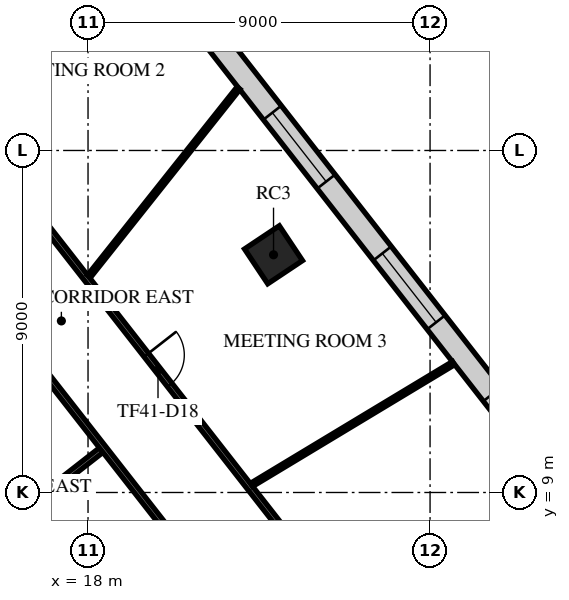
"""IFC4 building model, lengths in metres.
Left out: names, types, materials, properties, quantities, classifications, styles, units other than length and angle.
Written with IfcOpenShell. Run it as: python <this file> out.ifc"""

import sys

from ifc_helpers import new_model, si_unit, direction, frame, frame_2d, origin, origin_2d, place, context, subcontext, project, spatial, rectangle, extrude, element, fill, save


model = new_model("IFC4")
c1 = context("Model", 3, precision=1e-05, world=origin(), true_north=direction((0.0, 1.0)))
c2 = subcontext(c1, "Body", "Model", "MODEL_VIEW")
j1 = project(units=[si_unit("LENGTHUNIT", "METRE"), si_unit("PLANEANGLEUNIT", "RADIAN")], contexts=[c1])
p1 = place(None, origin())
s1 = spatial("IfcSite", under=j1, at=p1, CompositionType="ELEMENT")
p2 = place(p1, origin())
s2 = spatial("IfcBuilding", under=s1, at=p2, CompositionType="ELEMENT")
p3 = place(p2, frame((0.0, 0.0, 175.7)))
s3 = spatial("IfcBuildingStorey", under=s2, at=p3, CompositionType="ELEMENT", Elevation=175.7)
p4 = place(p3, frame((22.881, 15.255, 0.0), z_axis=(0.0, 0.0, 1.0), x_axis=(0.832028680356, 0.55473261583, 0.0)))
e1 = element("IfcColumn", 1, at=p4, inside=s3, PredefinedType="COLUMN", context=c2, shape_type="SweptSolid", body=[
    extrude(rectangle(XDim=1.1, YDim=1.1, at=origin_2d()), origin(), (0.0, 0.0, 1.0), 4.0),
])
p5 = place(p3, frame((36.503, 1.52, 0.0), z_axis=(0.0, 0.0, 1.0), x_axis=(-0.615660779349, 0.788011297363, 0.0)))
e2 = element("IfcWall", 2, at=p5, inside=s3, PredefinedType="STANDARD", context=c2, shape_type="SweptSolid", body=[
    extrude(rectangle(XDim=42.176, YDim=0.6, at=frame_2d((21.088, 0.0))), origin(), (0.0, 0.0, 1.0), 3.6),
])
p6 = place(p5, frame((1.138, 0.0, 0.9)))
e3 = element("IfcOpeningElement", 3, at=p6, cuts=e2, PredefinedType="OPENING", context=c2, shape_type="SweptSolid", body=[
    extrude(rectangle(XDim=2.3, YDim=2.1, at=frame_2d((1.15, 1.05))), frame((0.0, 0.31, 0.0), z_axis=(0.0, -1.0, 0.0), x_axis=(1.0, 0.0, 0.0)), (0.0, 0.0, 1.0), 0.62),
])
p7 = place(p5, frame((5.776, 0.0, 0.9)))
e4 = element("IfcOpeningElement", 4, at=p7, cuts=e2, PredefinedType="OPENING", context=c2, shape_type="SweptSolid", body=[
    extrude(rectangle(XDim=2.3, YDim=2.1, at=frame_2d((1.15, 1.05))), frame((0.0, 0.31, 0.0), z_axis=(0.0, -1.0, 0.0), x_axis=(1.0, 0.0, 0.0)), (0.0, 0.0, 1.0), 0.62),
])
p8 = place(p5, frame((10.476, 0.0, 0.9)))
e5 = element("IfcOpeningElement", 5, at=p8, cuts=e2, PredefinedType="OPENING", context=c2, shape_type="SweptSolid", body=[
    extrude(rectangle(XDim=2.3, YDim=2.1, at=frame_2d((1.15, 1.05))), frame((0.0, 0.31, 0.0), z_axis=(0.0, -1.0, 0.0), x_axis=(1.0, 0.0, 0.0)), (0.0, 0.0, 1.0), 0.62),
])
p9 = place(p5, frame((15.176, 0.0, 0.9)))
e6 = element("IfcOpeningElement", 6, at=p9, cuts=e2, PredefinedType="OPENING", context=c2, shape_type="SweptSolid", body=[
    extrude(rectangle(XDim=2.3, YDim=2.1, at=frame_2d((1.15, 1.05))), frame((0.0, 0.31, 0.0), z_axis=(0.0, -1.0, 0.0), x_axis=(1.0, 0.0, 0.0)), (0.0, 0.0, 1.0), 0.62),
])
p10 = place(p5, frame((19.876, 0.0, 0.9)))
e7 = element("IfcOpeningElement", 7, at=p10, cuts=e2, PredefinedType="OPENING", context=c2, shape_type="SweptSolid", body=[
    extrude(rectangle(XDim=2.3, YDim=2.1, at=frame_2d((1.15, 1.05))), frame((0.0, 0.31, 0.0), z_axis=(0.0, -1.0, 0.0), x_axis=(1.0, 0.0, 0.0)), (0.0, 0.0, 1.0), 0.62),
])
p11 = place(p5, frame((24.576, 0.0, 0.9)))
e8 = element("IfcOpeningElement", 8, at=p11, cuts=e2, PredefinedType="OPENING", context=c2, shape_type="SweptSolid", body=[
    extrude(rectangle(XDim=2.3, YDim=2.1, at=frame_2d((1.15, 1.05))), frame((0.0, 0.31, 0.0), z_axis=(0.0, -1.0, 0.0), x_axis=(1.0, 0.0, 0.0)), (0.0, 0.0, 1.0), 0.62),
])
p12 = place(p5, frame((33.976, 0.0, 0.9)))
e9 = element("IfcOpeningElement", 9, at=p12, cuts=e2, PredefinedType="OPENING", context=c2, shape_type="SweptSolid", body=[
    extrude(rectangle(XDim=2.3, YDim=2.1, at=frame_2d((1.15, 1.05))), frame((0.0, 0.31, 0.0), z_axis=(0.0, -1.0, 0.0), x_axis=(1.0, 0.0, 0.0)), (0.0, 0.0, 1.0), 0.62),
])
p13 = place(p5, frame((38.676, 0.0, 0.9)))
e10 = element("IfcOpeningElement", 10, at=p13, cuts=e2, PredefinedType="OPENING", context=c2, shape_type="SweptSolid", body=[
    extrude(rectangle(XDim=2.3, YDim=2.1, at=frame_2d((1.15, 1.05))), frame((0.0, 0.31, 0.0), z_axis=(0.0, -1.0, 0.0), x_axis=(1.0, 0.0, 0.0)), (0.0, 0.0, 1.0), 0.62),
])
p14 = place(p3, frame((9.713, 25.187, 0.0), z_axis=(0.0, 0.0, 1.0), x_axis=(0.615659714696, -0.788012129158, 0.0)))
e11 = element("IfcWall", 11, at=p14, inside=s3, PredefinedType="PARTITIONING", context=c2, shape_type="SweptSolid", body=[
    extrude(rectangle(XDim=27.811, YDim=0.15, at=frame_2d((13.905, 0.0))), origin(), (0.0, 0.0, 1.0), 3.15),
])
p15 = place(p14, frame((8.299, 0.0, 0.0)))
e12 = element("IfcOpeningElement", 12, at=p15, cuts=e11, PredefinedType="OPENING", context=c2, shape_type="SweptSolid", body=[
    extrude(rectangle(XDim=1.0, YDim=2.1, at=frame_2d((0.5, 1.05))), frame((0.0, 0.085, 0.0), z_axis=(0.0, -1.0, 0.0), x_axis=(1.0, 0.0, 0.0)), (0.0, 0.0, 1.0), 0.17),
])
p16 = place(p14, frame((15.951, 0.0, 0.0)))
e13 = element("IfcOpeningElement", 13, at=p16, cuts=e11, PredefinedType="OPENING", context=c2, shape_type="SweptSolid", body=[
    extrude(rectangle(XDim=1.0, YDim=2.1, at=frame_2d((0.5, 1.05))), frame((0.0, 0.085, 0.0), z_axis=(0.0, -1.0, 0.0), x_axis=(1.0, 0.0, 0.0)), (0.0, 0.0, 1.0), 0.17),
])
p17 = place(p3, frame((15.521, 7.908, 0.0), z_axis=(0.0, 0.0, 1.0), x_axis=(0.787935399888, 0.615757911524, 0.0)))
e14 = element("IfcWall", 14, at=p17, inside=s3, PredefinedType="PARTITIONING", context=c2, shape_type="SweptSolid", body=[
    extrude(rectangle(XDim=3.661, YDim=0.15, at=frame_2d((1.831, 0.0))), origin(), (0.0, 0.0, 1.0), 3.15),
])
p18 = place(p3, frame((16.929, 12.053, 0.0), z_axis=(0.0, 0.0, 1.0), x_axis=(0.615693171882, -0.787985988516, 0.0)))
e15 = element("IfcWall", 15, at=p18, inside=s3, PredefinedType="PARTITIONING", context=c2, shape_type="SweptSolid", body=[
    extrude(rectangle(XDim=13.018, YDim=0.15, at=frame_2d((6.509, 0.0))), origin(), (0.0, 0.0, 1.0), 3.15),
])
p19 = place(p3, frame((18.025, 14.689, 0.0), z_axis=(0.0, 0.0, 1.0), x_axis=(0.622051275171, 0.782976507348, 0.0)))
e16 = element("IfcWall", 16, at=p19, inside=s3, PredefinedType="PARTITIONING", context=c2, shape_type="SweptSolid", body=[
    extrude(rectangle(XDim=6.326, YDim=0.1, at=frame_2d((3.163, 0.0))), origin(), (0.0, 0.0, 1.0), 2.9),
])
p20 = place(p3, frame((22.305, 9.202, 0.0), z_axis=(0.0, 0.0, 1.0), x_axis=(0.856511778294, 0.516127478095, 0.0)))
e17 = element("IfcWall", 17, at=p20, inside=s3, PredefinedType="PARTITIONING", context=c2, shape_type="SweptSolid", body=[
    extrude(rectangle(XDim=6.201, YDim=0.1, at=frame_2d((3.101, 0.0))), origin(), (0.0, 0.0, 1.0), 2.9),
])
p21 = place(p9, origin())
e18 = element("IfcWindow", 18, at=p21, inside=s3, PartitioningType="SINGLE_PANEL", PredefinedType="WINDOW", context=c2, shape_type="SweptSolid", body=[
    extrude(rectangle(XDim=2.3, YDim=2.1, at=frame_2d((1.15, 1.05))), frame((0.0, 0.03, 0.0), z_axis=(0.0, -1.0, 0.0), x_axis=(1.0, 0.0, 0.0)), (0.0, 0.0, 1.0), 0.06),
])
fill(e6, e18)
p22 = place(p10, origin())
e19 = element("IfcWindow", 19, at=p22, inside=s3, PartitioningType="SINGLE_PANEL", PredefinedType="WINDOW", context=c2, shape_type="SweptSolid", body=[
    extrude(rectangle(XDim=2.3, YDim=2.1, at=frame_2d((1.15, 1.05))), frame((0.0, 0.03, 0.0), z_axis=(0.0, -1.0, 0.0), x_axis=(1.0, 0.0, 0.0)), (0.0, 0.0, 1.0), 0.06),
])
fill(e7, e19)
p23 = place(p16, origin())
e20 = element("IfcDoor", 20, at=p23, inside=s3, OperationType="SINGLE_SWING_LEFT", PredefinedType="DOOR", context=c2, shape_type="SweptSolid", body=[
    extrude(rectangle(XDim=1.0, YDim=2.1, at=frame_2d((0.5, 1.05))), frame((0.0, 0.025, 0.0), z_axis=(0.0, -1.0, 0.0), x_axis=(1.0, 0.0, 0.0)), (0.0, 0.0, 1.0), 0.05),
])
fill(e13, e20)
save(model, sys.argv[1])
